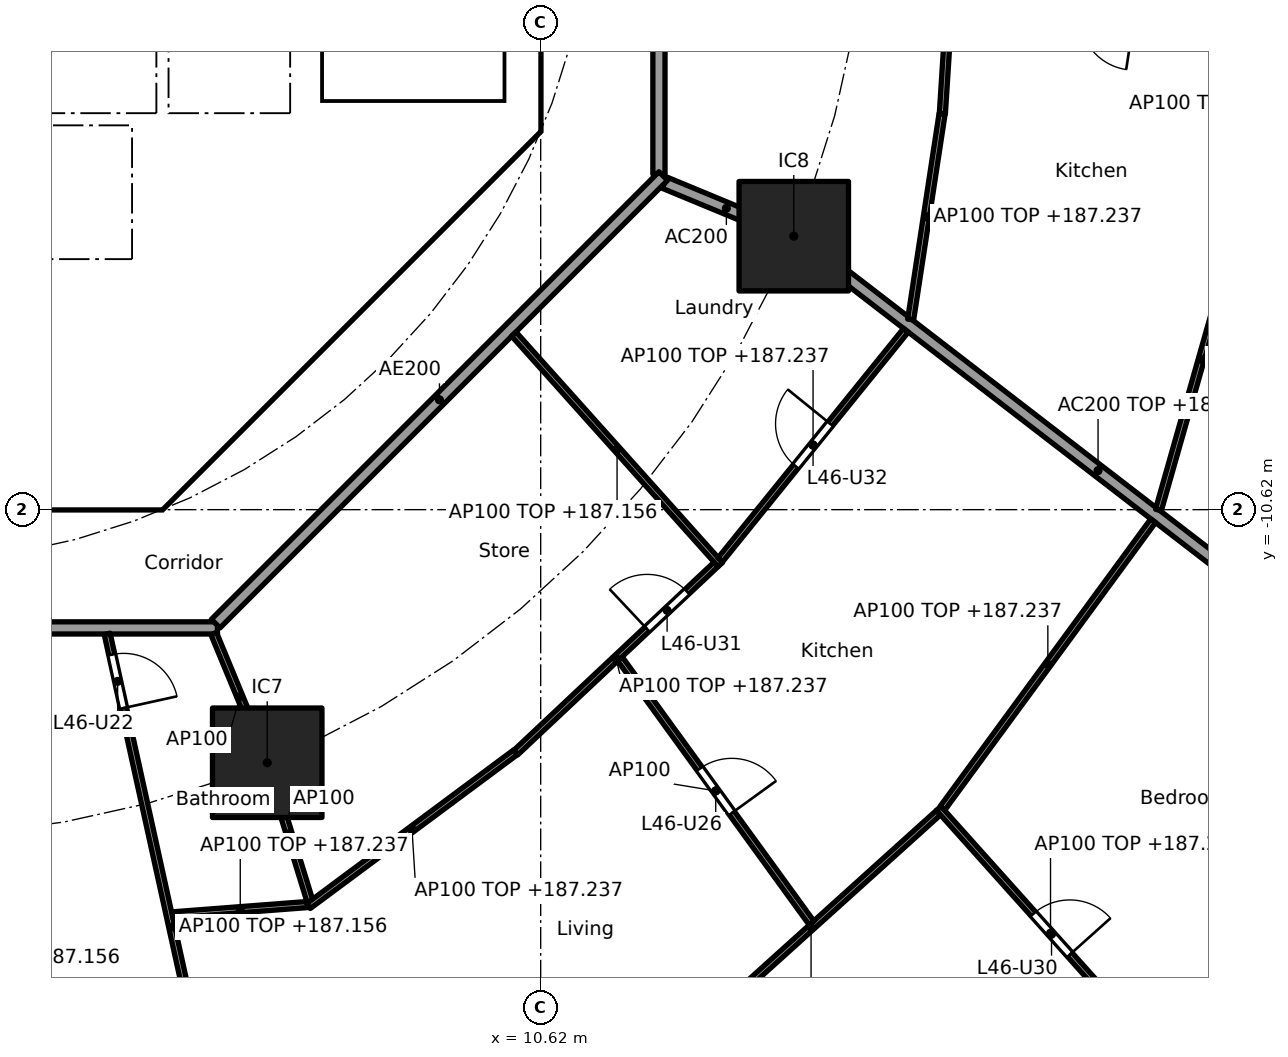
"""IFC4 building model, lengths in metres.
Left out: names, types, materials, properties, quantities, classifications, styles, units other than length and angle.
Written with IfcOpenShell. Run it as: python <this file> out.ifc"""

import sys

from ifc_helpers import new_model, si_unit, direction, frame, frame_2d, origin, origin_2d, place, context, subcontext, project, spatial, polyline, rectangle, outline, extrude, element, fill, save


model = new_model("IFC4")
c1 = context("Model", 3, precision=1e-05, world=origin(), true_north=direction((0.0, 1.0)))
c2 = subcontext(c1, "Body", "Model", "MODEL_VIEW")
j1 = project(units=[si_unit("LENGTHUNIT", "METRE"), si_unit("PLANEANGLEUNIT", "RADIAN")], contexts=[c1])
p1 = place(None, origin())
s1 = spatial("IfcSite", under=j1, at=p1, CompositionType="ELEMENT")
p2 = place(p1, origin())
s2 = spatial("IfcBuilding", under=s1, at=p2, CompositionType="ELEMENT")
p3 = place(p2, frame((0.0, 0.0, 184.4)))
s3 = spatial("IfcBuildingStorey", under=s2, at=p3, CompositionType="ELEMENT", Elevation=184.4)
for number, where, z_axis, x_axis in (
    (1, (6.123, -14.782, 0.0), (0.0, 0.0, 1.0), (1.0, 0.0, 0.0)),
    (2, (14.782, -6.123, 0.0), (0.0, 0.0, 1.0), (1.0, 0.0, 0.0)),
):
    element("IfcColumn", number, at=place(p3, frame(where, z_axis=z_axis, x_axis=x_axis)), inside=s3, PredefinedType="COLUMN", context=c2, shape_type="SweptSolid", body=[
        extrude(rectangle(XDim=1.8, YDim=1.8, at=origin_2d()), origin(), (0.0, 0.0, 1.0), 3.7),
    ])
p4 = place(p3, frame((4.613, -9.988, 0.0), z_axis=(0.0, 0.0, 1.0), x_axis=(0.707106781187, 0.707106781187, 0.0)))
e3 = element("IfcWall", 3, at=p4, inside=s3, PredefinedType="SHEAR", context=c2, shape_type="SweptSolid", body=[
    extrude(rectangle(XDim=7.602, YDim=0.6, at=frame_2d((3.801, 0.0))), origin(), (0.0, 0.0, 1.0), 3.44),
])
p5 = place(p4, frame((3.201, 0.0, 0.0)))
e4 = element("IfcOpeningElement", 4, at=p5, cuts=e3, PredefinedType="OPENING", context=c2, shape_type="SweptSolid", body=[
    extrude(rectangle(XDim=1.2, YDim=2.1, at=frame_2d((0.6, 1.05))), frame((0.0, 0.31, 0.0), z_axis=(0.0, -1.0, 0.0), x_axis=(1.0, 0.0, 0.0)), (0.0, 0.0, 1.0), 0.62),
])
p6 = place(p3, frame((4.0, -10.025, 0.0), z_axis=(0.0, 0.0, 1.0), x_axis=(0.0, 1.0, 0.0)))
e5 = element("IfcWall", 5, at=p6, inside=s3, PredefinedType="SOLIDWALL", context=c2, shape_type="SweptSolid", body=[
    extrude(rectangle(XDim=3.0, YDim=0.2, at=frame_2d((1.5, 0.0))), origin(), (0.0, 0.0, 1.0), 3.44),
])
p7 = place(p6, frame((0.975, 0.0, 0.0)))
e6 = element("IfcOpeningElement", 6, at=p7, cuts=e5, PredefinedType="OPENING", context=c2, shape_type="SweptSolid", body=[
    extrude(rectangle(XDim=1.1, YDim=2.1, at=frame_2d((0.55, 1.05))), frame((0.0, 0.11, 0.0), z_axis=(0.0, -1.0, 0.0), x_axis=(1.0, 0.0, 0.0)), (0.0, 0.0, 1.0), 0.22),
])
p8 = place(p3, frame((4.0, -6.5, 0.0), z_axis=(0.0, 0.0, 1.0), x_axis=(0.0, 1.0, 0.0)))
e7 = element("IfcWall", 7, at=p8, inside=s3, PredefinedType="SOLIDWALL", context=c2, shape_type="SweptSolid", body=[
    extrude(rectangle(XDim=2.2, YDim=0.2, at=frame_2d((1.1, 0.0))), origin(), (0.0, 0.0, 1.0), 3.44),
])
p9 = place(p8, frame((0.55, 0.0, 0.0)))
e8 = element("IfcOpeningElement", 8, at=p9, cuts=e7, PredefinedType="OPENING", context=c2, shape_type="SweptSolid", body=[
    extrude(rectangle(XDim=1.1, YDim=2.1, at=frame_2d((0.55, 1.05))), frame((0.0, 0.11, 0.0), z_axis=(0.0, -1.0, 0.0), x_axis=(1.0, 0.0, 0.0)), (0.0, 0.0, 1.0), 0.22),
])
p10 = place(p3, origin())
e9 = element("IfcWall", 9, at=p10, inside=s3, PredefinedType="SHEAR", context=c2, shape_type="SweptSolid", body=[
    extrude(outline(polyline([(-4.152, -10.025), (4.152, -10.025), (4.401, -9.776), (4.825, -10.2), (4.401, -10.625), (-4.401, -10.625), (-4.825, -10.2), (-4.401, -9.776), (-4.152, -10.025)])), origin(), (0.0, 0.0, 1.0), 3.44),
])
p11 = place(p3, origin())
e10 = element("IfcWall", 10, at=p11, inside=s3, PredefinedType="SHEAR", context=c2, shape_type="SweptSolid", body=[
    extrude(outline(polyline([(9.776, -4.401), (10.025, -4.152), (10.025, -3.801), (10.025, 4.152), (9.776, 4.401), (10.2, 4.825), (10.625, 4.401), (10.625, -4.401), (10.2, -4.825), (9.776, -4.401)])), origin(), (0.0, 0.0, 1.0), 3.44),
])
p12 = place(p3, origin())
e11 = element("IfcWall", 11, at=p12, inside=s3, PredefinedType="SOLIDWALL", context=c2, shape_type="SweptSolid", body=[
    extrude(outline(polyline([(-6.7, -2.1), (-6.5, -2.1), (-6.5, -4.1), (-2.3, -4.1), (-2.3, -2.1), (-2.1, -2.1), (-2.1, -4.1), (-0.1, -4.1), (-0.1, -2.1), (0.1, -2.1), (0.1, -4.1), (2.1, -4.1), (2.1, -2.1), (2.3, -2.1), (2.3, -4.1), (4.3, -4.1), (4.3, -2.1), (4.5, -2.1), (4.5, -4.1), (6.5, -4.1), (6.5, -2.1), (6.7, -2.1), (6.7, -4.3), (-6.7, -4.3), (-6.7, -2.1)])), origin(), (0.0, 0.0, 1.0), 3.44),
])
p13 = place(p3, origin())
e12 = element("IfcWall", 12, at=p13, inside=s3, PredefinedType="SOLIDWALL", context=c2, shape_type="SweptSolid", body=[
    extrude(outline(polyline([(4.1, -7.025), (-4.1, -7.025), (-4.1, -6.5), (4.1, -6.5), (4.1, -7.025)])), origin(), (0.0, 0.0, 1.0), 3.44),
])
p14 = place(p3, origin())
e13 = element("IfcWall", 13, at=p14, inside=s3, PredefinedType="SOLIDWALL", context=c2, shape_type="SweptSolid", body=[
    extrude(outline(polyline([(7.025, -3.9), (6.7, -3.9), (6.7, 3.9), (7.025, 3.9), (7.025, -3.9)])), origin(), (0.0, 0.0, 1.0), 3.44),
])
p15 = place(p3, origin())
e14 = element("IfcWall", 14, at=p15, inside=s3, PredefinedType="SOLIDWALL", context=c2, shape_type="SweptSolid", body=[
    extrude(outline(polyline([(10.025, -4.1), (6.7, -4.1), (6.7, -3.9), (10.025, -3.9), (10.025, -4.1)])), origin(), (0.0, 0.0, 1.0), 3.44),
])
p16 = place(p3, frame((12.657, -5.243, 0.0), z_axis=(0.0, 0.0, 1.0), x_axis=(0.92383017907, -0.382802560388, 0.0)))
e15 = element("IfcWall", 15, at=p16, inside=s3, PredefinedType="PARTITIONING", context=c2, shape_type="SweptSolid", body=[
    extrude(rectangle(XDim=2.2, YDim=0.2, at=frame_2d((1.1, 0.0))), origin(), (0.0, 0.0, 1.0), 3.44),
])
p17 = place(p3, frame((14.822, -6.154, 0.0), z_axis=(0.0, 0.0, 1.0), x_axis=(0.792203056092, -0.610257583254, 0.0)))
e16 = element("IfcWall", 16, at=p17, inside=s3, PredefinedType="PARTITIONING", context=c2, shape_type="SweptSolid", body=[
    extrude(rectangle(XDim=12.533, YDim=0.2, at=frame_2d((6.266, 0.0))), origin(), (0.0, 0.0, 1.0), 2.837),
])
p18 = place(p3, frame((12.565, -5.104, 0.0), z_axis=(0.0, 0.0, 1.0), x_axis=(0.0, 1.0, 0.0)))
e17 = element("IfcWall", 17, at=p18, inside=s3, PredefinedType="PARTITIONING", context=c2, shape_type="SweptSolid", body=[
    extrude(rectangle(XDim=10.209, YDim=0.2, at=frame_2d((5.104, 0.0))), origin(), (0.0, 0.0, 1.0), 3.44),
])
p19 = place(p3, frame((-5.104, -12.565, 0.0), z_axis=(0.0, 0.0, 1.0), x_axis=(1.0, 0.0, 0.0)))
e18 = element("IfcWall", 18, at=p19, inside=s3, PredefinedType="PARTITIONING", context=c2, shape_type="SweptSolid", body=[
    extrude(rectangle(XDim=10.409, YDim=0.2, at=frame_2d((5.205, 0.0))), origin(), (0.0, 0.0, 1.0), 3.44),
])
p20 = place(p19, frame((6.339, 0.0, 0.0)))
e19 = element("IfcOpeningElement", 19, at=p20, cuts=e18, PredefinedType="OPENING", context=c2, shape_type="SweptSolid", body=[
    extrude(rectangle(XDim=1.0, YDim=2.1, at=frame_2d((0.5, 1.05))), frame((0.0, 0.11, 0.0), z_axis=(0.0, -1.0, 0.0), x_axis=(1.0, 0.0, 0.0)), (0.0, 0.0, 1.0), 0.22),
])
p21 = place(p3, frame((5.275, -12.494, 0.0), z_axis=(0.0, 0.0, 1.0), x_axis=(0.707106781187, 0.707106781187, 0.0)))
e20 = element("IfcWall", 20, at=p21, inside=s3, PredefinedType="PARTITIONING", context=c2, shape_type="SweptSolid", body=[
    extrude(rectangle(XDim=10.409, YDim=0.2, at=frame_2d((5.205, 0.0))), origin(), (0.0, 0.0, 1.0), 3.44),
])
p22 = place(p3, frame((17.485, -0.05, 0.0), z_axis=(0.0, 0.0, 1.0), x_axis=(-0.063673473968, -0.997970785501, 0.0)))
e21 = element("IfcWall", 21, at=p22, inside=s3, PredefinedType="PARTITIONING", context=c2, shape_type="SweptSolid", body=[
    extrude(rectangle(XDim=4.072, YDim=0.1, at=frame_2d((2.036, 0.0))), origin(), (0.0, 0.0, 1.0), 2.837),
])
p23 = place(p22, frame((0.543, 0.0, 0.0)))
e22 = element("IfcOpeningElement", 22, at=p23, cuts=e21, PredefinedType="OPENING", context=c2, shape_type="SweptSolid", body=[
    extrude(rectangle(XDim=0.9, YDim=2.1, at=frame_2d((0.45, 1.05))), frame((0.0, 0.06, 0.0), z_axis=(0.0, -1.0, 0.0), x_axis=(1.0, 0.0, 0.0)), (0.0, 0.0, 1.0), 0.12),
])
p24 = place(p3, frame((3.491, -12.662, 0.0), z_axis=(0.0, 0.0, 1.0), x_axis=(0.215082442833, -0.976595895335, 0.0)))
e23 = element("IfcWall", 23, at=p24, inside=s3, PredefinedType="PARTITIONING", context=c2, shape_type="SweptSolid", body=[
    extrude(rectangle(XDim=9.878, YDim=0.1, at=frame_2d((4.939, 0.0))), origin(), (0.0, 0.0, 1.0), 2.756),
])
p25 = place(p24, frame((0.35, 0.0, 0.0)))
e24 = element("IfcOpeningElement", 24, at=p25, cuts=e23, PredefinedType="OPENING", context=c2, shape_type="SweptSolid", body=[
    extrude(rectangle(XDim=0.9, YDim=2.1, at=frame_2d((0.45, 1.05))), frame((0.0, 0.06, 0.0), z_axis=(0.0, -1.0, 0.0), x_axis=(1.0, 0.0, 0.0)), (0.0, 0.0, 1.0), 0.12),
])
p26 = place(p24, frame((6.861, 0.0, 0.0)))
e25 = element("IfcOpeningElement", 25, at=p26, cuts=e23, PredefinedType="OPENING", context=c2, shape_type="SweptSolid", body=[
    extrude(rectangle(XDim=0.9, YDim=2.1, at=frame_2d((0.45, 1.05))), frame((0.0, 0.06, 0.0), z_axis=(0.0, -1.0, 0.0), x_axis=(1.0, 0.0, 0.0)), (0.0, 0.0, 1.0), 0.12),
])
p27 = place(p3, frame((4.568, -17.284, 0.0), z_axis=(0.0, 0.0, 1.0), x_axis=(0.997076339393, 0.076411867029, 0.0)))
e26 = element("IfcWall", 26, at=p27, inside=s3, PredefinedType="PARTITIONING", context=c2, shape_type="SweptSolid", body=[
    extrude(rectangle(XDim=2.23, YDim=0.1, at=frame_2d((1.115, 0.0))), origin(), (0.0, 0.0, 1.0), 2.837),
])
p28 = place(p3, frame((5.243, -12.657, 0.0), z_axis=(0.0, 0.0, 1.0), x_axis=(0.382719158442, -0.923864733477, 0.0)))
e27 = element("IfcWall", 27, at=p28, inside=s3, PredefinedType="PARTITIONING", context=c2, shape_type="SweptSolid", body=[
    extrude(rectangle(XDim=2.25, YDim=0.1, at=frame_2d((1.125, 0.0))), origin(), (0.0, 0.0, 1.0), 3.44),
])
p29 = place(p3, frame((6.138, -14.83, 0.0), z_axis=(0.0, 0.0, 1.0), x_axis=(0.29476151767, -0.955570849127, 0.0)))
e28 = element("IfcWall", 28, at=p29, inside=s3, PredefinedType="PARTITIONING", context=c2, shape_type="SweptSolid", body=[
    extrude(rectangle(XDim=2.336, YDim=0.1, at=frame_2d((1.168, 0.0))), origin(), (0.0, 0.0, 1.0), 3.44),
])
p30 = place(p3, frame((6.801, -17.139, 0.0), z_axis=(0.0, 0.0, 1.0), x_axis=(0.802795005531, 0.596255129198, 0.0)))
e29 = element("IfcWall", 29, at=p30, inside=s3, PredefinedType="PARTITIONING", context=c2, shape_type="SweptSolid", body=[
    extrude(rectangle(XDim=4.242, YDim=0.1, at=frame_2d((2.121, 0.0))), origin(), (0.0, 0.0, 1.0), 2.837),
])
p31 = place(p3, frame((10.21, -14.614, 0.0), z_axis=(0.0, 0.0, 1.0), x_axis=(0.728883199496, 0.684638066055, 0.0)))
e30 = element("IfcWall", 30, at=p31, inside=s3, PredefinedType="PARTITIONING", context=c2, shape_type="SweptSolid", body=[
    extrude(rectangle(XDim=4.519, YDim=0.1, at=frame_2d((2.26, 0.0))), origin(), (0.0, 0.0, 1.0), 2.837),
])
p32 = place(p31, frame((2.964, 0.0, 0.0)))
e31 = element("IfcOpeningElement", 31, at=p32, cuts=e30, PredefinedType="OPENING", context=c2, shape_type="SweptSolid", body=[
    extrude(rectangle(XDim=0.9, YDim=2.1, at=frame_2d((0.45, 1.05))), frame((0.0, 0.06, 0.0), z_axis=(0.0, -1.0, 0.0), x_axis=(1.0, 0.0, 0.0)), (0.0, 0.0, 1.0), 0.12),
])
p33 = place(p3, frame((12.971, -19.38, 0.0), z_axis=(0.0, 0.0, 1.0), x_axis=(0.742768881471, 0.669547898748, 0.0)))
e32 = element("IfcWall", 32, at=p33, inside=s3, PredefinedType="PARTITIONING", context=c2, shape_type="SweptSolid", body=[
    extrude(rectangle(XDim=5.642, YDim=0.1, at=frame_2d((2.821, 0.0))), origin(), (0.0, 0.0, 1.0), 2.837),
])
p34 = place(p3, frame((11.923, -13.073, 0.0), z_axis=(0.0, 0.0, 1.0), x_axis=(0.587178522891, -0.809457461672, 0.0)))
e33 = element("IfcWall", 33, at=p34, inside=s3, PredefinedType="PARTITIONING", context=c2, shape_type="SweptSolid", body=[
    extrude(rectangle(XDim=5.366, YDim=0.1, at=frame_2d((2.683, 0.0))), origin(), (0.0, 0.0, 1.0), 3.44),
])
p35 = place(p34, frame((2.233, 0.0, 0.0)))
e34 = element("IfcOpeningElement", 34, at=p35, cuts=e33, PredefinedType="OPENING", context=c2, shape_type="SweptSolid", body=[
    extrude(rectangle(XDim=0.9, YDim=2.1, at=frame_2d((0.45, 1.05))), frame((0.0, 0.06, 0.0), z_axis=(0.0, -1.0, 0.0), x_axis=(1.0, 0.0, 0.0)), (0.0, 0.0, 1.0), 0.12),
])
p36 = place(p3, frame((10.178, -7.732, 0.0), z_axis=(0.0, 0.0, 1.0), x_axis=(0.667285466359, -0.744802058527, 0.0)))
e35 = element("IfcWall", 35, at=p36, inside=s3, PredefinedType="PARTITIONING", context=c2, shape_type="SweptSolid", body=[
    extrude(rectangle(XDim=5.09, YDim=0.1, at=frame_2d((2.545, 0.0))), origin(), (0.0, 0.0, 1.0), 2.756),
])
p37 = place(p3, frame((13.572, -11.447, 0.0), z_axis=(0.0, 0.0, 1.0), x_axis=(0.628738316533, 0.777616955399, 0.0)))
e36 = element("IfcWall", 36, at=p37, inside=s3, PredefinedType="PARTITIONING", context=c2, shape_type="SweptSolid", body=[
    extrude(rectangle(XDim=4.857, YDim=0.1, at=frame_2d((2.429, 0.0))), origin(), (0.0, 0.0, 1.0), 2.837),
])
p38 = place(p37, frame((1.979, 0.0, 0.0)))
e37 = element("IfcOpeningElement", 37, at=p38, cuts=e36, PredefinedType="OPENING", context=c2, shape_type="SweptSolid", body=[
    extrude(rectangle(XDim=0.9, YDim=2.1, at=frame_2d((0.45, 1.05))), frame((0.0, 0.06, 0.0), z_axis=(0.0, -1.0, 0.0), x_axis=(1.0, 0.0, 0.0)), (0.0, 0.0, 1.0), 0.12),
])
p39 = place(p3, frame((17.166, -15.532, 0.0), z_axis=(0.0, 0.0, 1.0), x_axis=(0.66728415915, -0.744803229684, 0.0)))
e38 = element("IfcWall", 38, at=p39, inside=s3, PredefinedType="PARTITIONING", context=c2, shape_type="SweptSolid", body=[
    extrude(rectangle(XDim=5.511, YDim=0.1, at=frame_2d((2.756, 0.0))), origin(), (0.0, 0.0, 1.0), 2.837),
])
p40 = place(p39, frame((2.331, 0.0, 0.0)))
e39 = element("IfcOpeningElement", 39, at=p40, cuts=e38, PredefinedType="OPENING", context=c2, shape_type="SweptSolid", body=[
    extrude(rectangle(XDim=0.9, YDim=2.1, at=frame_2d((0.45, 1.05))), frame((0.0, 0.06, 0.0), z_axis=(0.0, -1.0, 0.0), x_axis=(1.0, 0.0, 0.0)), (0.0, 0.0, 1.0), 0.12),
])
p41 = place(p3, frame((17.229, -15.529, 0.0), z_axis=(0.0, 0.0, 1.0), x_axis=(0.591110768293, 0.806590391468, 0.0)))
e40 = element("IfcWall", 40, at=p41, inside=s3, PredefinedType="PARTITIONING", context=c2, shape_type="SweptSolid", body=[
    extrude(rectangle(XDim=5.86, YDim=0.1, at=frame_2d((2.93, 0.0))), origin(), (0.0, 0.0, 1.0), 2.837),
])
p42 = place(p3, frame((16.704, -7.493, 0.0), z_axis=(0.0, 0.0, 1.0), x_axis=(0.1510806336, 0.988521442434, 0.0)))
e41 = element("IfcWall", 41, at=p42, inside=s3, PredefinedType="PARTITIONING", context=c2, shape_type="SweptSolid", body=[
    extrude(rectangle(XDim=3.419, YDim=0.1, at=frame_2d((1.71, 0.0))), origin(), (0.0, 0.0, 1.0), 2.837),
])
p43 = place(p3, frame((20.779, -10.625, 0.0), z_axis=(0.0, 0.0, 1.0), x_axis=(0.273819702124, 0.961781040949, 0.0)))
e42 = element("IfcWall", 42, at=p43, inside=s3, PredefinedType="PARTITIONING", context=c2, shape_type="SweptSolid", body=[
    extrude(rectangle(XDim=5.152, YDim=0.1, at=frame_2d((2.576, 0.0))), origin(), (0.0, 0.0, 1.0), 2.837),
])
p44 = place(p3, frame((17.407, -2.039, 0.0), z_axis=(0.0, 0.0, 1.0), x_axis=(0.98858728603, -0.150649188184, 0.0)))
e43 = element("IfcWall", 43, at=p44, inside=s3, PredefinedType="PARTITIONING", context=c2, shape_type="SweptSolid", body=[
    extrude(rectangle(XDim=11.441, YDim=0.1, at=frame_2d((5.721, 0.0))), origin(), (0.0, 0.0, 1.0), 2.905),
])
p45 = place(p44, frame((7.832, 0.0, 0.0)))
e44 = element("IfcOpeningElement", 44, at=p45, cuts=e43, PredefinedType="OPENING", context=c2, shape_type="SweptSolid", body=[
    extrude(rectangle(XDim=0.9, YDim=2.1, at=frame_2d((0.45, 1.05))), frame((0.0, 0.06, 0.0), z_axis=(0.0, -1.0, 0.0), x_axis=(1.0, 0.0, 0.0)), (0.0, 0.0, 1.0), 0.12),
])
p46 = place(p44, frame((2.111, 0.0, 0.0)))
e45 = element("IfcOpeningElement", 45, at=p46, cuts=e43, PredefinedType="OPENING", context=c2, shape_type="SweptSolid", body=[
    extrude(rectangle(XDim=0.9, YDim=2.1, at=frame_2d((0.45, 1.05))), frame((0.0, 0.06, 0.0), z_axis=(0.0, -1.0, 0.0), x_axis=(1.0, 0.0, 0.0)), (0.0, 0.0, 1.0), 0.12),
])
p47 = place(p9, origin())
e46 = element("IfcDoor", 46, at=p47, inside=s3, OperationType="DOUBLE_DOOR_SLIDING", PredefinedType="DOOR", context=c2, shape_type="SweptSolid", body=[
    extrude(rectangle(XDim=1.1, YDim=2.1, at=frame_2d((0.55, 1.05))), frame((0.0, 0.025, 0.0), z_axis=(0.0, -1.0, 0.0), x_axis=(1.0, 0.0, 0.0)), (0.0, 0.0, 1.0), 0.05),
])
fill(e8, e46)
p48 = place(p7, origin())
e47 = element("IfcDoor", 47, at=p48, inside=s3, OperationType="SINGLE_SWING_RIGHT", PredefinedType="DOOR", context=c2, shape_type="SweptSolid", body=[
    extrude(rectangle(XDim=1.1, YDim=2.1, at=frame_2d((0.55, 1.05))), frame((0.0, 0.025, 0.0), z_axis=(0.0, -1.0, 0.0), x_axis=(1.0, 0.0, 0.0)), (0.0, 0.0, 1.0), 0.05),
])
fill(e6, e47)
p49 = place(p5, origin())
e48 = element("IfcDoor", 48, at=p49, inside=s3, OperationType="SINGLE_SWING_RIGHT", PredefinedType="DOOR", context=c2, shape_type="SweptSolid", body=[
    extrude(rectangle(XDim=1.2, YDim=2.1, at=frame_2d((0.6, 1.05))), frame((0.0, 0.025, 0.0), z_axis=(0.0, -1.0, 0.0), x_axis=(1.0, 0.0, 0.0)), (0.0, 0.0, 1.0), 0.05),
])
fill(e4, e48)
p50 = place(p25, origin())
e49 = element("IfcDoor", 49, at=p50, inside=s3, OperationType="SINGLE_SWING_RIGHT", PredefinedType="DOOR", context=c2, shape_type="SweptSolid", body=[
    extrude(rectangle(XDim=0.9, YDim=2.1, at=frame_2d((0.45, 1.05))), frame((0.0, 0.025, 0.0), z_axis=(0.0, -1.0, 0.0), x_axis=(1.0, 0.0, 0.0)), (0.0, 0.0, 1.0), 0.05),
])
fill(e24, e49)
p51 = place(p35, origin())
e50 = element("IfcDoor", 50, at=p51, inside=s3, OperationType="SINGLE_SWING_RIGHT", PredefinedType="DOOR", context=c2, shape_type="SweptSolid", body=[
    extrude(rectangle(XDim=0.9, YDim=2.1, at=frame_2d((0.45, 1.05))), frame((0.0, 0.025, 0.0), z_axis=(0.0, -1.0, 0.0), x_axis=(1.0, 0.0, 0.0)), (0.0, 0.0, 1.0), 0.05),
])
fill(e34, e50)
p52 = place(p40, origin())
e51 = element("IfcDoor", 51, at=p52, inside=s3, OperationType="SINGLE_SWING_RIGHT", PredefinedType="DOOR", context=c2, shape_type="SweptSolid", body=[
    extrude(rectangle(XDim=0.9, YDim=2.1, at=frame_2d((0.45, 1.05))), frame((0.0, 0.025, 0.0), z_axis=(0.0, -1.0, 0.0), x_axis=(1.0, 0.0, 0.0)), (0.0, 0.0, 1.0), 0.05),
])
fill(e39, e51)
p53 = place(p32, origin())
e52 = element("IfcDoor", 52, at=p53, inside=s3, OperationType="SINGLE_SWING_LEFT", PredefinedType="DOOR", context=c2, shape_type="SweptSolid", body=[
    extrude(rectangle(XDim=0.9, YDim=2.1, at=frame_2d((0.45, 1.05))), frame((0.0, 0.025, 0.0), z_axis=(0.0, -1.0, 0.0), x_axis=(1.0, 0.0, 0.0)), (0.0, 0.0, 1.0), 0.05),
])
fill(e31, e52)
p54 = place(p38, origin())
e53 = element("IfcDoor", 53, at=p54, inside=s3, OperationType="SINGLE_SWING_RIGHT", PredefinedType="DOOR", context=c2, shape_type="SweptSolid", body=[
    extrude(rectangle(XDim=0.9, YDim=2.1, at=frame_2d((0.45, 1.05))), frame((0.0, 0.025, 0.0), z_axis=(0.0, -1.0, 0.0), x_axis=(1.0, 0.0, 0.0)), (0.0, 0.0, 1.0), 0.05),
])
fill(e37, e53)
save(model, sys.argv[1])
